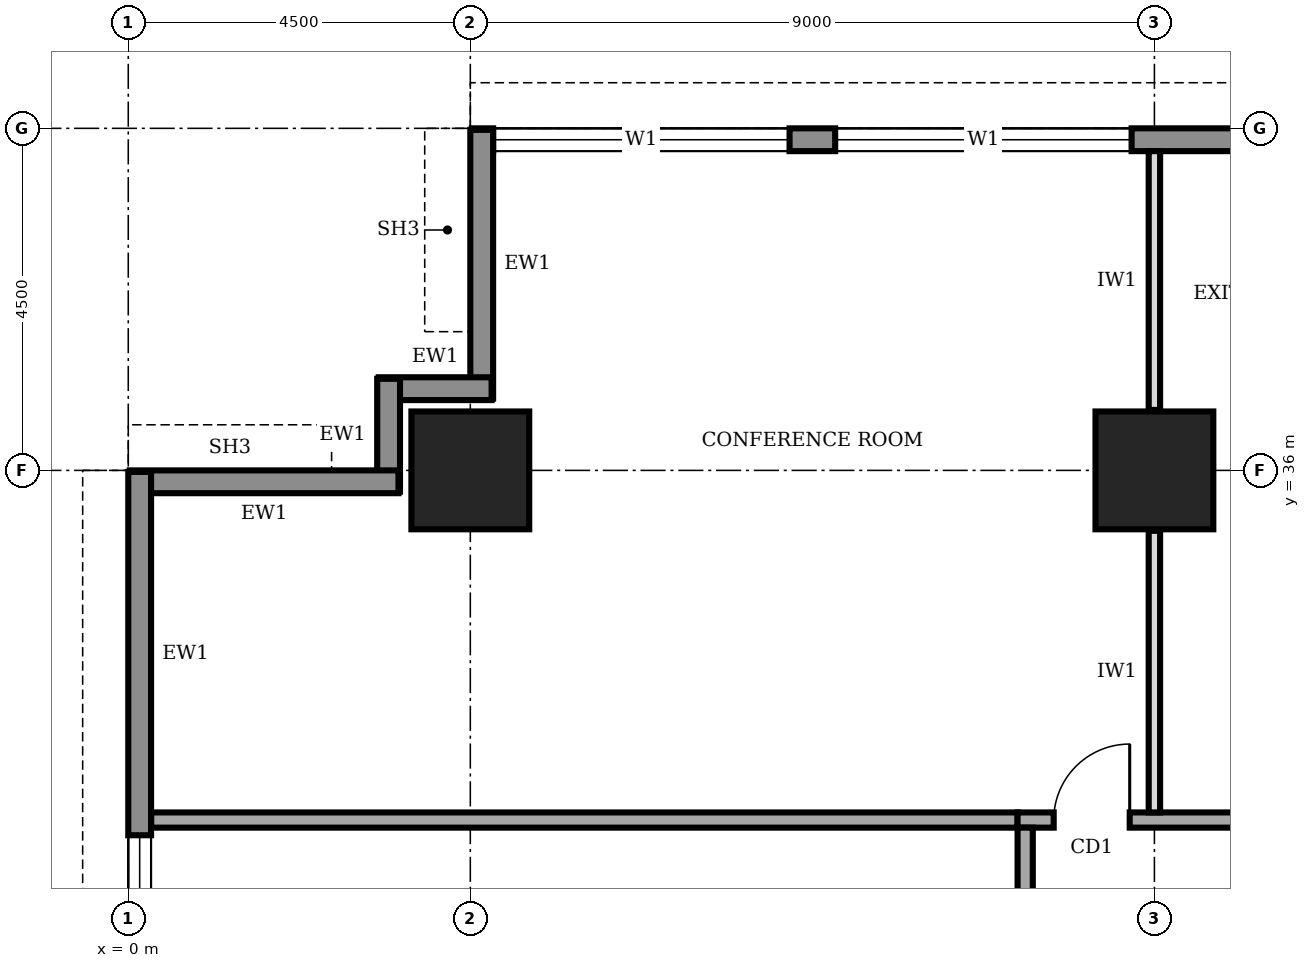
"""IFC4 building model, lengths in metres.
Left out: names, types, materials, properties, quantities, classifications, styles, units other than length and angle.
Written with IfcOpenShell. Run it as: python <this file> out.ifc"""

import sys

from ifc_helpers import new_model, si_unit, direction, frame, frame_2d, origin, origin_2d, place, context, subcontext, project, spatial, rectangle, extrude, element, fill, save


model = new_model("IFC4")
c1 = context("Model", 3, precision=1e-05, world=origin(), true_north=direction((0.0, 1.0)))
c2 = subcontext(c1, "Body", "Model", "MODEL_VIEW")
j1 = project(units=[si_unit("LENGTHUNIT", "METRE"), si_unit("PLANEANGLEUNIT", "RADIAN")], contexts=[c1])
p1 = place(None, origin())
s1 = spatial("IfcSite", under=j1, at=p1, CompositionType="ELEMENT")
p2 = place(p1, origin())
s2 = spatial("IfcBuilding", under=s1, at=p2, CompositionType="ELEMENT")
p3 = place(p2, frame((0.0, 0.0, 209.0)))
s3 = spatial("IfcBuildingStorey", under=s2, at=p3, CompositionType="ELEMENT", Elevation=209.0)
for number, where, z_axis, x_axis in (
    (1, (4.5, 36.0, 0.0), (0.0, 0.0, 1.0), (1.0, 0.0, 0.0)),
    (2, (13.5, 36.0, 0.0), (0.0, 0.0, 1.0), (1.0, 0.0, 0.0)),
):
    element("IfcColumn", number, at=place(p3, frame(where, z_axis=z_axis, x_axis=x_axis)), inside=s3, PredefinedType="COLUMN", context=c2, shape_type="SweptSolid", body=[
        extrude(rectangle(XDim=1.55, YDim=1.55, at=origin_2d()), origin(), (0.0, 0.0, 1.0), 4.0),
    ])
p4 = place(p3, frame((35.98, 40.35, 0.0), z_axis=(0.0, 0.0, 1.0), x_axis=(-1.0, 0.0, 0.0)))
e3 = element("IfcWall", 3, at=p4, inside=s3, PredefinedType="STANDARD", context=c2, shape_type="SweptSolid", body=[
    extrude(rectangle(XDim=31.46, YDim=0.3, at=frame_2d((15.73, 0.0))), origin(), (0.0, 0.0, 1.0), 3.75),
])
p5 = place(p4, frame((27.28, 0.0, 0.9)))
e4 = element("IfcOpeningElement", 4, at=p5, cuts=e3, PredefinedType="OPENING", context=c2, shape_type="SweptSolid", body=[
    extrude(rectangle(XDim=3.9, YDim=2.2, at=frame_2d((1.95, 1.1))), frame((0.0, 0.16, 0.0), z_axis=(0.0, -1.0, 0.0), x_axis=(1.0, 0.0, 0.0)), (0.0, 0.0, 1.0), 0.32),
])
p6 = place(p4, frame((22.78, 0.0, 0.9)))
e5 = element("IfcOpeningElement", 5, at=p6, cuts=e3, PredefinedType="OPENING", context=c2, shape_type="SweptSolid", body=[
    extrude(rectangle(XDim=3.9, YDim=2.2, at=frame_2d((1.95, 1.1))), frame((0.0, 0.16, 0.0), z_axis=(0.0, -1.0, 0.0), x_axis=(1.0, 0.0, 0.0)), (0.0, 0.0, 1.0), 0.32),
])
p7 = place(p4, frame((4.78, 0.0, 0.9)))
e6 = element("IfcOpeningElement", 6, at=p7, cuts=e3, PredefinedType="OPENING", context=c2, shape_type="SweptSolid", body=[
    extrude(rectangle(XDim=3.9, YDim=2.2, at=frame_2d((1.95, 1.1))), frame((0.0, 0.16, 0.0), z_axis=(0.0, -1.0, 0.0), x_axis=(1.0, 0.0, 0.0)), (0.0, 0.0, 1.0), 0.32),
])
p8 = place(p3, frame((4.65, 40.48, 0.0), z_axis=(0.0, 0.0, 1.0), x_axis=(0.0, -1.0, 0.0)))
e7 = element("IfcWall", 7, at=p8, inside=s3, PredefinedType="STANDARD", context=c2, shape_type="SweptSolid", body=[
    extrude(rectangle(XDim=3.535, YDim=0.3, at=frame_2d((1.768, 0.0))), origin(), (0.0, 0.0, 1.0), 2.85),
])
for number, where, z_axis, x_axis in (
    (8, (4.78, 37.075, 0.0), (0.0, 0.0, 1.0), (-1.0, 0.0, 0.0)),
    (9, (3.425, 37.205, 0.0), (0.0, 0.0, 1.0), (0.0, -1.0, 0.0)),
):
    element("IfcWall", number, at=place(p3, frame(where, z_axis=z_axis, x_axis=x_axis)), inside=s3, PredefinedType="STANDARD", context=c2, shape_type="SweptSolid", body=[
        extrude(rectangle(XDim=1.485, YDim=0.3, at=frame_2d((0.743, 0.0))), origin(), (0.0, 0.0, 1.0), 3.75),
    ])
p9 = place(p3, frame((3.555, 35.85, 0.0), z_axis=(0.0, 0.0, 1.0), x_axis=(-1.0, 0.0, 0.0)))
e10 = element("IfcWall", 10, at=p9, inside=s3, PredefinedType="STANDARD", context=c2, shape_type="SweptSolid", body=[
    extrude(rectangle(XDim=3.535, YDim=0.3, at=frame_2d((1.768, 0.0))), origin(), (0.0, 0.0, 1.0), 2.85),
])
p10 = place(p3, frame((0.15, 35.98, 0.0), z_axis=(0.0, 0.0, 1.0), x_axis=(0.0, -1.0, 0.0)))
e11 = element("IfcWall", 11, at=p10, inside=s3, PredefinedType="STANDARD", context=c2, shape_type="SweptSolid", body=[
    extrude(rectangle(XDim=31.46, YDim=0.3, at=frame_2d((15.73, 0.0))), origin(), (0.0, 0.0, 1.0), 3.75),
])
p11 = place(p10, frame((27.28, 0.0, 0.9)))
e12 = element("IfcOpeningElement", 12, at=p11, cuts=e11, PredefinedType="OPENING", context=c2, shape_type="SweptSolid", body=[
    extrude(rectangle(XDim=3.9, YDim=2.2, at=frame_2d((1.95, 1.1))), frame((0.0, 0.16, 0.0), z_axis=(0.0, -1.0, 0.0), x_axis=(1.0, 0.0, 0.0)), (0.0, 0.0, 1.0), 0.32),
])
p12 = place(p10, frame((22.78, 0.0, 0.9)))
e13 = element("IfcOpeningElement", 13, at=p12, cuts=e11, PredefinedType="OPENING", context=c2, shape_type="SweptSolid", body=[
    extrude(rectangle(XDim=3.9, YDim=2.2, at=frame_2d((1.95, 1.1))), frame((0.0, 0.16, 0.0), z_axis=(0.0, -1.0, 0.0), x_axis=(1.0, 0.0, 0.0)), (0.0, 0.0, 1.0), 0.32),
])
p13 = place(p10, frame((18.28, 0.0, 0.9)))
e14 = element("IfcOpeningElement", 14, at=p13, cuts=e11, PredefinedType="OPENING", context=c2, shape_type="SweptSolid", body=[
    extrude(rectangle(XDim=3.9, YDim=2.2, at=frame_2d((1.95, 1.1))), frame((0.0, 0.16, 0.0), z_axis=(0.0, -1.0, 0.0), x_axis=(1.0, 0.0, 0.0)), (0.0, 0.0, 1.0), 0.32),
])
p14 = place(p10, frame((13.78, 0.0, 0.9)))
e15 = element("IfcOpeningElement", 15, at=p14, cuts=e11, PredefinedType="OPENING", context=c2, shape_type="SweptSolid", body=[
    extrude(rectangle(XDim=3.9, YDim=2.2, at=frame_2d((1.95, 1.1))), frame((0.0, 0.16, 0.0), z_axis=(0.0, -1.0, 0.0), x_axis=(1.0, 0.0, 0.0)), (0.0, 0.0, 1.0), 0.32),
])
p15 = place(p10, frame((9.28, 0.0, 0.9)))
e16 = element("IfcOpeningElement", 16, at=p15, cuts=e11, PredefinedType="OPENING", context=c2, shape_type="SweptSolid", body=[
    extrude(rectangle(XDim=3.9, YDim=2.2, at=frame_2d((1.95, 1.1))), frame((0.0, 0.16, 0.0), z_axis=(0.0, -1.0, 0.0), x_axis=(1.0, 0.0, 0.0)), (0.0, 0.0, 1.0), 0.32),
])
p16 = place(p10, frame((4.78, 0.0, 0.9)))
e17 = element("IfcOpeningElement", 17, at=p16, cuts=e11, PredefinedType="OPENING", context=c2, shape_type="SweptSolid", body=[
    extrude(rectangle(XDim=3.9, YDim=2.2, at=frame_2d((1.95, 1.1))), frame((0.0, 0.16, 0.0), z_axis=(0.0, -1.0, 0.0), x_axis=(1.0, 0.0, 0.0)), (0.0, 0.0, 1.0), 0.32),
])
p17 = place(p3, frame((28.6, 31.4, 0.0), z_axis=(0.0, 0.0, 1.0), x_axis=(-1.0, 0.0, 0.0)))
e18 = element("IfcWall", 18, at=p17, inside=s3, PredefinedType="SOLIDWALL", context=c2, shape_type="SweptSolid", body=[
    extrude(rectangle(XDim=16.9, YDim=0.2, at=frame_2d((8.45, 0.0))), origin(), (0.0, 0.0, 1.0), 3.75),
])
p18 = place(p17, frame((15.425, 0.0, 0.0)))
e19 = element("IfcOpeningElement", 19, at=p18, cuts=e18, PredefinedType="OPENING", context=c2, shape_type="SweptSolid", body=[
    extrude(rectangle(XDim=1.0, YDim=2.1, at=frame_2d((0.5, 1.05))), frame((0.0, 0.11, 0.0), z_axis=(0.0, -1.0, 0.0), x_axis=(1.0, 0.0, 0.0)), (0.0, 0.0, 1.0), 0.22),
])
p19 = place(p17, frame((12.35, 0.0, 0.0)))
e20 = element("IfcOpeningElement", 20, at=p19, cuts=e18, PredefinedType="OPENING", context=c2, shape_type="SweptSolid", body=[
    extrude(rectangle(XDim=1.0, YDim=2.1, at=frame_2d((0.5, 1.05))), frame((0.0, 0.11, 0.0), z_axis=(0.0, -1.0, 0.0), x_axis=(1.0, 0.0, 0.0)), (0.0, 0.0, 1.0), 0.22),
])
p20 = place(p17, frame((5.6, 0.0, 0.0)))
e21 = element("IfcOpeningElement", 21, at=p20, cuts=e18, PredefinedType="OPENING", context=c2, shape_type="SweptSolid", body=[
    extrude(rectangle(XDim=1.0, YDim=2.1, at=frame_2d((0.5, 1.05))), frame((0.0, 0.11, 0.0), z_axis=(0.0, -1.0, 0.0), x_axis=(1.0, 0.0, 0.0)), (0.0, 0.0, 1.0), 0.22),
])
p21 = place(p17, frame((0.275, 0.0, 0.0)))
e22 = element("IfcOpeningElement", 22, at=p21, cuts=e18, PredefinedType="OPENING", context=c2, shape_type="SweptSolid", body=[
    extrude(rectangle(XDim=1.0, YDim=2.1, at=frame_2d((0.5, 1.05))), frame((0.0, 0.11, 0.0), z_axis=(0.0, -1.0, 0.0), x_axis=(1.0, 0.0, 0.0)), (0.0, 0.0, 1.0), 0.22),
])
p22 = place(p3, frame((11.8, 31.3, 0.0), z_axis=(0.0, 0.0, 1.0), x_axis=(0.0, -1.0, 0.0)))
e23 = element("IfcWall", 23, at=p22, inside=s3, PredefinedType="SOLIDWALL", context=c2, shape_type="SweptSolid", body=[
    extrude(rectangle(XDim=23.8, YDim=0.2, at=frame_2d((11.9, 0.0))), origin(), (0.0, 0.0, 1.0), 3.75),
])
p23 = place(p22, frame((20.3, 0.0, 0.0)))
e24 = element("IfcOpeningElement", 24, at=p23, cuts=e23, PredefinedType="OPENING", context=c2, shape_type="SweptSolid", body=[
    extrude(rectangle(XDim=1.0, YDim=2.1, at=frame_2d((0.5, 1.05))), frame((0.0, 0.11, 0.0), z_axis=(0.0, -1.0, 0.0), x_axis=(1.0, 0.0, 0.0)), (0.0, 0.0, 1.0), 0.22),
])
p24 = place(p22, frame((16.15, 0.0, 0.0)))
e25 = element("IfcOpeningElement", 25, at=p24, cuts=e23, PredefinedType="OPENING", context=c2, shape_type="SweptSolid", body=[
    extrude(rectangle(XDim=0.9, YDim=2.1, at=frame_2d((0.45, 1.05))), frame((0.0, 0.11, 0.0), z_axis=(0.0, -1.0, 0.0), x_axis=(1.0, 0.0, 0.0)), (0.0, 0.0, 1.0), 0.22),
])
p25 = place(p22, frame((12.95, 0.0, 0.0)))
e26 = element("IfcOpeningElement", 26, at=p25, cuts=e23, PredefinedType="OPENING", context=c2, shape_type="SweptSolid", body=[
    extrude(rectangle(XDim=0.9, YDim=2.1, at=frame_2d((0.45, 1.05))), frame((0.0, 0.11, 0.0), z_axis=(0.0, -1.0, 0.0), x_axis=(1.0, 0.0, 0.0)), (0.0, 0.0, 1.0), 0.22),
])
p26 = place(p22, frame((7.4, 0.0, 0.0)))
e27 = element("IfcOpeningElement", 27, at=p26, cuts=e23, PredefinedType="OPENING", context=c2, shape_type="SweptSolid", body=[
    extrude(rectangle(XDim=0.9, YDim=2.1, at=frame_2d((0.45, 1.05))), frame((0.0, 0.11, 0.0), z_axis=(0.0, -1.0, 0.0), x_axis=(1.0, 0.0, 0.0)), (0.0, 0.0, 1.0), 0.22),
])
p27 = place(p22, frame((4.8, 0.0, 0.0)))
e28 = element("IfcOpeningElement", 28, at=p27, cuts=e23, PredefinedType="OPENING", context=c2, shape_type="SweptSolid", body=[
    extrude(rectangle(XDim=1.0, YDim=2.1, at=frame_2d((0.5, 1.05))), frame((0.0, 0.11, 0.0), z_axis=(0.0, -1.0, 0.0), x_axis=(1.0, 0.0, 0.0)), (0.0, 0.0, 1.0), 0.22),
])
p28 = place(p22, frame((9.9, 0.0, 0.0)))
e29 = element("IfcOpeningElement", 29, at=p28, cuts=e23, PredefinedType="OPENING", context=c2, shape_type="SweptSolid", body=[
    extrude(rectangle(XDim=1.0, YDim=2.1, at=frame_2d((0.5, 1.05))), frame((0.0, 0.11, 0.0), z_axis=(0.0, -1.0, 0.0), x_axis=(1.0, 0.0, 0.0)), (0.0, 0.0, 1.0), 0.22),
])
p29 = place(p22, frame((1.55, 0.0, 0.0)))
e30 = element("IfcOpeningElement", 30, at=p29, cuts=e23, PredefinedType="OPENING", context=c2, shape_type="SweptSolid", body=[
    extrude(rectangle(XDim=1.0, YDim=2.1, at=frame_2d((0.5, 1.05))), frame((0.0, 0.11, 0.0), z_axis=(0.0, -1.0, 0.0), x_axis=(1.0, 0.0, 0.0)), (0.0, 0.0, 1.0), 0.22),
])
p30 = place(p3, frame((0.3, 31.4, 0.0), z_axis=(0.0, 0.0, 1.0), x_axis=(1.0, 0.0, 0.0)))
e31 = element("IfcWall", 31, at=p30, inside=s3, PredefinedType="SOLIDWALL", context=c2, shape_type="SweptSolid", body=[
    extrude(rectangle(XDim=11.4, YDim=0.2, at=frame_2d((5.7, 0.0))), origin(), (0.0, 0.0, 1.0), 3.75),
])
p31 = place(p3, frame((13.5, 31.5, 0.0), z_axis=(0.0, 0.0, 1.0), x_axis=(0.0, 1.0, 0.0)))
e32 = element("IfcWall", 32, at=p31, inside=s3, PredefinedType="PARTITIONING", context=c2, shape_type="SweptSolid", body=[
    extrude(rectangle(XDim=3.705, YDim=0.15, at=frame_2d((1.853, 0.0))), origin(), (0.0, 0.0, 1.0), 2.85),
])
p32 = place(p3, frame((13.5, 36.795, 0.0), z_axis=(0.0, 0.0, 1.0), x_axis=(0.0, 1.0, 0.0)))
e33 = element("IfcWall", 33, at=p32, inside=s3, PredefinedType="PARTITIONING", context=c2, shape_type="SweptSolid", body=[
    extrude(rectangle(XDim=3.405, YDim=0.15, at=frame_2d((1.703, 0.0))), origin(), (0.0, 0.0, 1.0), 2.85),
])
p33 = place(p5, origin())
e34 = element("IfcWindow", 34, at=p33, inside=s3, PartitioningType="SINGLE_PANEL", PredefinedType="WINDOW", context=c2, shape_type="SweptSolid", body=[
    extrude(rectangle(XDim=3.9, YDim=2.2, at=frame_2d((1.95, 1.1))), frame((0.0, 0.03, 0.0), z_axis=(0.0, -1.0, 0.0), x_axis=(1.0, 0.0, 0.0)), (0.0, 0.0, 1.0), 0.06),
])
fill(e4, e34)
p34 = place(p6, origin())
e35 = element("IfcWindow", 35, at=p34, inside=s3, PartitioningType="SINGLE_PANEL", PredefinedType="WINDOW", context=c2, shape_type="SweptSolid", body=[
    extrude(rectangle(XDim=3.9, YDim=2.2, at=frame_2d((1.95, 1.1))), frame((0.0, 0.03, 0.0), z_axis=(0.0, -1.0, 0.0), x_axis=(1.0, 0.0, 0.0)), (0.0, 0.0, 1.0), 0.06),
])
fill(e5, e35)
p35 = place(p16, origin())
e36 = element("IfcWindow", 36, at=p35, inside=s3, PartitioningType="SINGLE_PANEL", PredefinedType="WINDOW", context=c2, shape_type="SweptSolid", body=[
    extrude(rectangle(XDim=3.9, YDim=2.2, at=frame_2d((1.95, 1.1))), frame((0.0, 0.03, 0.0), z_axis=(0.0, -1.0, 0.0), x_axis=(1.0, 0.0, 0.0)), (0.0, 0.0, 1.0), 0.06),
])
fill(e17, e36)
p36 = place(p18, frame((1.0, 0.0, 0.0), z_axis=(0.0, 0.0, 1.0), x_axis=(-1.0, 0.0, 0.0)))
e37 = element("IfcDoor", 37, at=p36, inside=s3, OperationType="SINGLE_SWING_RIGHT", PredefinedType="DOOR", context=c2, shape_type="SweptSolid", body=[
    extrude(rectangle(XDim=1.0, YDim=2.1, at=frame_2d((0.5, 1.05))), frame((0.0, 0.025, 0.0), z_axis=(0.0, -1.0, 0.0), x_axis=(1.0, 0.0, 0.0)), (0.0, 0.0, 1.0), 0.05),
])
fill(e19, e37)
save(model, sys.argv[1])
